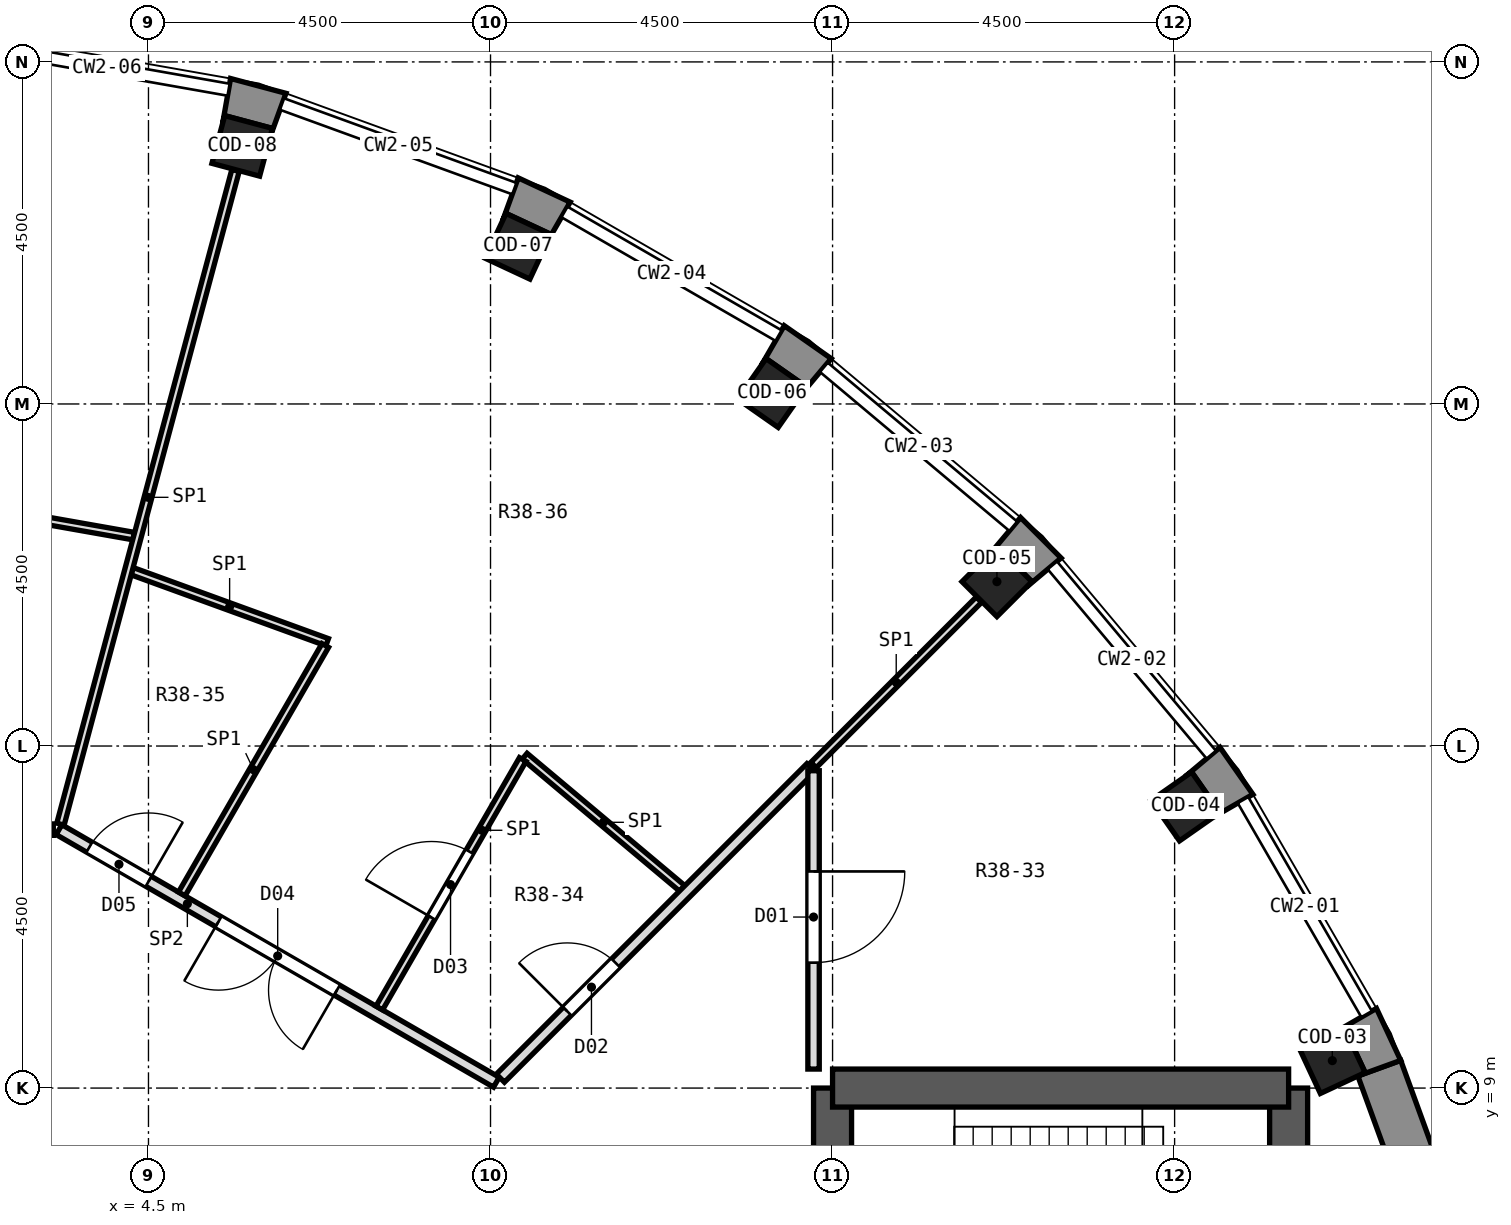
"""IFC4 building model, lengths in metres.
Left out: names, types, materials, properties, quantities, classifications, styles, units other than length and angle.
Written with IfcOpenShell. Run it as: python <this file> out.ifc"""

import sys

from ifc_helpers import new_model, si_unit, direction, frame, frame_2d, origin, origin_2d, place, context, subcontext, project, spatial, polyline, rectangle, outline, extrude, element, fill, save


model = new_model("IFC4")
c1 = context("Model", 3, precision=1e-05, world=origin(), true_north=direction((0.0, 1.0)))
c2 = subcontext(c1, "Body", "Model", "MODEL_VIEW")
j1 = project(units=[si_unit("LENGTHUNIT", "METRE"), si_unit("PLANEANGLEUNIT", "RADIAN")], contexts=[c1])
p1 = place(None, origin())
s1 = spatial("IfcSite", under=j1, at=p1, CompositionType="ELEMENT")
p2 = place(p1, origin())
s2 = spatial("IfcBuilding", under=s1, at=p2, CompositionType="ELEMENT")
p3 = place(p2, frame((0.0, 0.0, 279.2)))
s3 = spatial("IfcBuildingStorey", under=s2, at=p3, CompositionType="ELEMENT", Elevation=279.2)
for number, where, z_axis, x_axis in (
    (1, (20.075, 9.361, 0.0), (0.0, 0.0, 1.0), (0.906, 0.423, 0.0)),
    (2, (18.144, 12.705, 0.0), (0.0, 0.0, 1.0), (0.819, 0.574, 0.0)),
    (3, (15.662, 15.662, 0.0), (0.0, 0.0, 1.0), (0.707, 0.707, 0.0)),
    (4, (12.705, 18.144, 0.0), (0.0, 0.0, 1.0), (0.574, 0.819, 0.0)),
    (5, (9.361, 20.075, 0.0), (0.0, 0.0, 1.0), (0.423, 0.906, 0.0)),
    (6, (5.733, 21.395, 0.0), (0.0, 0.0, 1.0), (0.259, 0.966, 0.0)),
):
    element("IfcColumn", number, at=place(p3, frame(where, z_axis=z_axis, x_axis=x_axis)), inside=s3, PredefinedType="COLUMN", context=c2, shape_type="SweptSolid", body=[
        extrude(rectangle(XDim=0.65, YDim=0.65, at=origin_2d()), origin(), (0.0, 0.0, 1.0), 5.0),
    ])
p4 = place(p3, frame((13.5, -9.0, 0.0), z_axis=(0.0, 0.0, 1.0), x_axis=(0.0, 1.0, 0.0)))
e7 = element("IfcWall", 7, at=p4, inside=s3, PredefinedType="SHEAR", context=c2, shape_type="SweptSolid", body=[
    extrude(rectangle(XDim=18.0, YDim=0.5, at=frame_2d((9.0, 0.0))), origin(), (0.0, 0.0, 1.0), 5.0),
])
p5 = place(p4, frame((15.4, 0.0, 0.0)))
e8 = element("IfcOpeningElement", 8, at=p5, cuts=e7, PredefinedType="OPENING", context=c2, shape_type="SweptSolid", body=[
    extrude(rectangle(XDim=1.2, YDim=2.1, at=frame_2d((0.6, 1.05))), frame((0.0, 0.262, 0.0), z_axis=(0.0, -1.0, 0.0), x_axis=(1.0, 0.0, 0.0)), (0.0, 0.0, 1.0), 0.524),
])
p6 = place(p4, frame((1.4, 0.0, 0.0)))
e9 = element("IfcOpeningElement", 9, at=p6, cuts=e7, PredefinedType="OPENING", context=c2, shape_type="SweptSolid", body=[
    extrude(rectangle(XDim=1.2, YDim=2.1, at=frame_2d((0.6, 1.05))), frame((0.0, 0.262, 0.0), z_axis=(0.0, -1.0, 0.0), x_axis=(1.0, 0.0, 0.0)), (0.0, 0.0, 1.0), 0.524),
])
p7 = place(p4, frame((7.5, 0.0, 0.0)))
e10 = element("IfcOpeningElement", 10, at=p7, cuts=e7, PredefinedType="OPENING", context=c2, shape_type="SweptSolid", body=[
    extrude(rectangle(XDim=3.0, YDim=2.4, at=frame_2d((1.5, 1.2))), frame((0.0, 0.262, 0.0), z_axis=(0.0, -1.0, 0.0), x_axis=(1.0, 0.0, 0.0)), (0.0, 0.0, 1.0), 0.524),
])
p8 = place(p3, frame((19.5, -9.0, 0.0), z_axis=(0.0, 0.0, 1.0), x_axis=(0.0, 1.0, 0.0)))
e11 = element("IfcWall", 11, at=p8, inside=s3, PredefinedType="SHEAR", context=c2, shape_type="SweptSolid", body=[
    extrude(rectangle(XDim=18.0, YDim=0.5, at=frame_2d((9.0, 0.0))), origin(), (0.0, 0.0, 1.0), 5.0),
])
p9 = place(p8, frame((9.45, 0.0, 0.0)))
e12 = element("IfcOpeningElement", 12, at=p9, cuts=e11, PredefinedType="OPENING", context=c2, shape_type="SweptSolid", body=[
    extrude(rectangle(XDim=0.9, YDim=2.1, at=frame_2d((0.45, 1.05))), frame((0.0, 0.262, 0.0), z_axis=(0.0, -1.0, 0.0), x_axis=(1.0, 0.0, 0.0)), (0.0, 0.0, 1.0), 0.524),
])
p10 = place(p8, frame((7.65, 0.0, 0.0)))
e13 = element("IfcOpeningElement", 13, at=p10, cuts=e11, PredefinedType="OPENING", context=c2, shape_type="SweptSolid", body=[
    extrude(rectangle(XDim=0.9, YDim=2.1, at=frame_2d((0.45, 1.05))), frame((0.0, 0.262, 0.0), z_axis=(0.0, -1.0, 0.0), x_axis=(1.0, 0.0, 0.0)), (0.0, 0.0, 1.0), 0.524),
])
p11 = place(p3, frame((13.5, 9.0, 0.0), z_axis=(0.0, 0.0, 1.0), x_axis=(1.0, 0.0, 0.0)))
e14 = element("IfcWall", 14, at=p11, inside=s3, PredefinedType="SHEAR", context=c2, shape_type="SweptSolid", body=[
    extrude(rectangle(XDim=6.0, YDim=0.5, at=frame_2d((3.0, 0.0))), origin(), (0.0, 0.0, 1.0), 5.0),
])
p12 = place(p3, frame((21.805, 6.206, 0.0), z_axis=(0.0, 0.0, 1.0), x_axis=(-0.342056509473, 0.939679383794, 0.0)))
e15 = element("IfcWall", 15, at=p12, inside=s3, PredefinedType="SOLIDWALL", context=c2, shape_type="SweptSolid", body=[
    extrude(rectangle(XDim=3.252, YDim=0.6, at=frame_2d((1.626, 0.0))), origin(), (0.0, 0.0, 1.0), 4.45),
])
p13 = place(p3, origin())
e16 = element("IfcWall", 16, at=p13, inside=s3, PredefinedType="SOLIDWALL", context=c2, shape_type="SweptSolid", body=[
    extrude(outline(polyline([(20.975, 9.364), (20.656, 10.048), (20.136, 9.748), (20.232, 9.793), (20.507, 9.204), (20.411, 9.159), (20.975, 9.364)])), origin(), (0.0, 0.0, 1.0), 4.45),
])
p14 = place(p3, origin())
e17 = element("IfcWall", 17, at=p14, inside=s3, PredefinedType="SOLIDWALL", context=c2, shape_type="SweptSolid", body=[
    extrude(outline(polyline([(19.03, 12.864), (18.597, 13.482), (18.137, 13.097), (18.224, 13.157), (18.597, 12.625), (18.51, 12.564), (19.03, 12.864)])), origin(), (0.0, 0.0, 1.0), 4.45),
])
p15 = place(p3, origin())
e18 = element("IfcWall", 18, at=p15, inside=s3, PredefinedType="SOLIDWALL", context=c2, shape_type="SweptSolid", body=[
    extrude(outline(polyline([(15.973, 16.507), (15.588, 16.047), (15.662, 16.122), (16.122, 15.662), (16.047, 15.588), (16.507, 15.973), (15.973, 16.507)])), origin(), (0.0, 0.0, 1.0), 4.45),
])
p16 = place(p3, origin())
e19 = element("IfcWall", 19, at=p16, inside=s3, PredefinedType="SOLIDWALL", context=c2, shape_type="SweptSolid", body=[
    extrude(outline(polyline([(12.864, 19.03), (12.564, 18.51), (12.625, 18.597), (13.157, 18.224), (13.097, 18.137), (13.482, 18.597), (12.864, 19.03)])), origin(), (0.0, 0.0, 1.0), 4.45),
])
p17 = place(p3, origin())
e20 = element("IfcWall", 20, at=p17, inside=s3, PredefinedType="SOLIDWALL", context=c2, shape_type="SweptSolid", body=[
    extrude(outline(polyline([(10.048, 20.656), (9.364, 20.975), (9.159, 20.411), (9.204, 20.507), (9.793, 20.232), (9.748, 20.136), (10.048, 20.656)])), origin(), (0.0, 0.0, 1.0), 4.45),
])
p18 = place(p3, origin())
e21 = element("IfcWall", 21, at=p18, inside=s3, PredefinedType="SOLIDWALL", context=c2, shape_type="SweptSolid", body=[
    extrude(outline(polyline([(5.58, 22.282), (5.476, 21.691), (5.503, 21.793), (6.131, 21.625), (6.104, 21.523), (6.309, 22.087), (5.58, 22.282)])), origin(), (0.0, 0.0, 1.0), 4.45),
])
p19 = place(p3, frame((9.449, 13.366, 0.0), z_axis=(0.0, 0.0, 1.0), x_axis=(0.766094066965, -0.642728465653, 0.0)))
e22 = element("IfcWall", 22, at=p19, inside=s3, PredefinedType="PARTITIONING", context=c2, shape_type="SweptSolid", body=[
    extrude(rectangle(XDim=2.705, YDim=0.1, at=frame_2d((1.353, 0.0))), origin(), (0.0, 0.0, 1.0), 4.45),
])
p20 = place(p3, frame((3.323, 12.4, 0.0), z_axis=(0.0, 0.0, 1.0), x_axis=(0.865961614908, -0.500110469302, 0.0)))
e23 = element("IfcWall", 23, at=p20, inside=s3, PredefinedType="PARTITIONING", context=c2, shape_type="SweptSolid", body=[
    extrude(rectangle(XDim=6.645, YDim=0.15, at=frame_2d((3.322, 0.0))), origin(), (0.0, 0.0, 1.0), 4.45),
])
p21 = place(p20, frame((2.422, 0.0, 0.0)))
e24 = element("IfcOpeningElement", 24, at=p21, cuts=e23, PredefinedType="OPENING", context=c2, shape_type="SweptSolid", body=[
    extrude(rectangle(XDim=1.8, YDim=2.1, at=frame_2d((0.9, 1.05))), frame((0.0, 0.087, 0.0), z_axis=(0.0, -1.0, 0.0), x_axis=(1.0, 0.0, 0.0)), (0.0, 0.0, 1.0), 0.174),
])
p22 = place(p20, frame((0.461, 0.0, 0.0)))
e25 = element("IfcOpeningElement", 25, at=p22, cuts=e23, PredefinedType="OPENING", context=c2, shape_type="SweptSolid", body=[
    extrude(rectangle(XDim=0.9, YDim=2.1, at=frame_2d((0.45, 1.05))), frame((0.0, 0.087, 0.0), z_axis=(0.0, -1.0, 0.0), x_axis=(1.0, 0.0, 0.0)), (0.0, 0.0, 1.0), 0.174),
])
p23 = place(p3, frame((4.285, 15.8, 0.0), z_axis=(0.0, 0.0, 1.0), x_axis=(0.939712477851, -0.34196558156, 0.0)))
e26 = element("IfcWall", 26, at=p23, inside=s3, PredefinedType="PARTITIONING", context=c2, shape_type="SweptSolid", body=[
    extrude(rectangle(XDim=2.731, YDim=0.1, at=frame_2d((1.365, 0.0))), origin(), (0.0, 0.0, 1.0), 4.45),
])
p24 = place(p3, frame((1.5, 16.757, 0.0), z_axis=(0.0, 0.0, 1.0), x_axis=(0.984768889955, -0.173868436975, 0.0)))
e27 = element("IfcWall", 27, at=p24, inside=s3, PredefinedType="PARTITIONING", context=c2, shape_type="SweptSolid", body=[
    extrude(rectangle(XDim=2.849, YDim=0.1, at=frame_2d((1.425, 0.0))), origin(), (0.0, 0.0, 1.0), 4.45),
])
p25 = place(p3, frame((-3.273, 12.4, 0.0), z_axis=(0.0, 0.0, 1.0), x_axis=(1.0, 0.0, 0.0)))
e28 = element("IfcWall", 28, at=p25, inside=s3, PredefinedType="PARTITIONING", context=c2, shape_type="SweptSolid", body=[
    extrude(rectangle(XDim=6.521, YDim=0.15, at=frame_2d((3.26, 0.0))), origin(), (0.0, 0.0, 1.0), 4.45),
])
p26 = place(p25, frame((5.235, 0.0, 0.0)))
e29 = element("IfcOpeningElement", 29, at=p26, cuts=e28, PredefinedType="OPENING", context=c2, shape_type="SweptSolid", body=[
    extrude(rectangle(XDim=0.9, YDim=2.1, at=frame_2d((0.45, 1.05))), frame((0.0, 0.087, 0.0), z_axis=(0.0, -1.0, 0.0), x_axis=(1.0, 0.0, 0.0)), (0.0, 0.0, 1.0), 0.174),
])
p27 = place(p25, frame((2.373, 0.0, 0.0)))
e30 = element("IfcOpeningElement", 30, at=p27, cuts=e28, PredefinedType="OPENING", context=c2, shape_type="SweptSolid", body=[
    extrude(rectangle(XDim=1.8, YDim=2.1, at=frame_2d((0.9, 1.05))), frame((0.0, 0.087, 0.0), z_axis=(0.0, -1.0, 0.0), x_axis=(1.0, 0.0, 0.0)), (0.0, 0.0, 1.0), 0.174),
])
p28 = place(p25, frame((0.412, 0.0, 0.0)))
e31 = element("IfcOpeningElement", 31, at=p28, cuts=e28, PredefinedType="OPENING", context=c2, shape_type="SweptSolid", body=[
    extrude(rectangle(XDim=0.9, YDim=2.1, at=frame_2d((0.45, 1.05))), frame((0.0, 0.087, 0.0), z_axis=(0.0, -1.0, 0.0), x_axis=(1.0, 0.0, 0.0)), (0.0, 0.0, 1.0), 0.174),
])
p29 = place(p3, frame((13.25, 13.25, 0.0), z_axis=(0.0, 0.0, 1.0), x_axis=(0.707106781187, 0.707106781187, 0.0)))
e32 = element("IfcWall", 32, at=p29, inside=s3, PredefinedType="PARTITIONING", context=c2, shape_type="SweptSolid", body=[
    extrude(rectangle(XDim=3.077, YDim=0.1, at=frame_2d((1.538, 0.0))), origin(), (0.0, 0.0, 1.0), 4.45),
])
p30 = place(p3, frame((9.13, 9.13, 0.0), z_axis=(0.0, 0.0, 1.0), x_axis=(0.707106781187, 0.707106781187, 0.0)))
e33 = element("IfcWall", 33, at=p30, inside=s3, PredefinedType="PARTITIONING", context=c2, shape_type="SweptSolid", body=[
    extrude(rectangle(XDim=5.777, YDim=0.15, at=frame_2d((2.888, 0.0))), origin(), (0.0, 0.0, 1.0), 4.45),
])
p31 = place(p30, frame((1.244, 0.0, 0.0)))
e34 = element("IfcOpeningElement", 34, at=p31, cuts=e33, PredefinedType="OPENING", context=c2, shape_type="SweptSolid", body=[
    extrude(rectangle(XDim=0.9, YDim=2.1, at=frame_2d((0.45, 1.05))), frame((0.0, 0.087, 0.0), z_axis=(0.0, -1.0, 0.0), x_axis=(1.0, 0.0, 0.0)), (0.0, 0.0, 1.0), 0.174),
])
p32 = place(p3, frame((7.537, 10.053, 0.0), z_axis=(0.0, 0.0, 1.0), x_axis=(0.499957569697, 0.866049899545, 0.0)))
e35 = element("IfcWall", 35, at=p32, inside=s3, PredefinedType="PARTITIONING", context=c2, shape_type="SweptSolid", body=[
    extrude(rectangle(XDim=3.775, YDim=0.1, at=frame_2d((1.888, 0.0))), origin(), (0.0, 0.0, 1.0), 4.45),
])
p33 = place(p32, frame((1.375, 0.0, 0.0)))
e36 = element("IfcOpeningElement", 36, at=p33, cuts=e35, PredefinedType="OPENING", context=c2, shape_type="SweptSolid", body=[
    extrude(rectangle(XDim=1.0, YDim=2.1, at=frame_2d((0.5, 1.05))), frame((0.0, 0.062, 0.0), z_axis=(0.0, -1.0, 0.0), x_axis=(1.0, 0.0, 0.0)), (0.0, 0.0, 1.0), 0.124),
])
p34 = place(p3, frame((4.938, 11.554, 0.0), z_axis=(0.0, 0.0, 1.0), x_axis=(0.50004158446, 0.866001393654, 0.0)))
e37 = element("IfcWall", 37, at=p34, inside=s3, PredefinedType="PARTITIONING", context=c2, shape_type="SweptSolid", body=[
    extrude(rectangle(XDim=3.775, YDim=0.1, at=frame_2d((1.887, 0.0))), origin(), (0.0, 0.0, 1.0), 4.45),
])
p35 = place(p3, frame((3.342, 12.472, 0.0), z_axis=(0.0, 0.0, 1.0), x_axis=(0.258684909749, 0.965961757767, 0.0)))
e38 = element("IfcWall", 38, at=p35, inside=s3, PredefinedType="PARTITIONING", context=c2, shape_type="SweptSolid", body=[
    extrude(rectangle(XDim=8.903, YDim=0.1, at=frame_2d((4.451, 0.0))), origin(), (0.0, 0.0, 1.0), 4.45),
])
p36 = place(p3, frame((13.25, 9.25, 0.0), z_axis=(0.0, 0.0, 1.0), x_axis=(0.0, 1.0, 0.0)))
e39 = element("IfcWall", 39, at=p36, inside=s3, PredefinedType="PARTITIONING", context=c2, shape_type="SweptSolid", body=[
    extrude(rectangle(XDim=3.925, YDim=0.15, at=frame_2d((1.962, 0.0))), origin(), (0.0, 0.0, 1.0), 4.45),
])
p37 = place(p36, frame((1.4, 0.0, 0.0)))
e40 = element("IfcOpeningElement", 40, at=p37, cuts=e39, PredefinedType="OPENING", context=c2, shape_type="SweptSolid", body=[
    extrude(rectangle(XDim=1.2, YDim=2.1, at=frame_2d((0.6, 1.05))), frame((0.0, 0.087, 0.0), z_axis=(0.0, -1.0, 0.0), x_axis=(1.0, 0.0, 0.0)), (0.0, 0.0, 1.0), 0.174),
])
p38 = place(p37, frame((1.2, 0.0, 0.0), z_axis=(0.0, 0.0, 1.0), x_axis=(-1.0, 0.0, 0.0)))
e41 = element("IfcDoor", 41, at=p38, inside=s3, OperationType="SINGLE_SWING_LEFT", PredefinedType="DOOR", context=c2, shape_type="SweptSolid", body=[
    extrude(rectangle(XDim=1.2, YDim=2.1, at=frame_2d((0.6, 1.05))), frame((0.0, 0.025, 0.0), z_axis=(0.0, -1.0, 0.0), x_axis=(1.0, 0.0, 0.0)), (0.0, 0.0, 1.0), 0.05),
])
fill(e40, e41)
p39 = place(p31, origin())
e42 = element("IfcDoor", 42, at=p39, inside=s3, OperationType="SINGLE_SWING_LEFT", PredefinedType="DOOR", context=c2, shape_type="SweptSolid", body=[
    extrude(rectangle(XDim=0.9, YDim=2.1, at=frame_2d((0.45, 1.05))), frame((0.0, 0.025, 0.0), z_axis=(0.0, -1.0, 0.0), x_axis=(1.0, 0.0, 0.0)), (0.0, 0.0, 1.0), 0.05),
])
fill(e34, e42)
p40 = place(p33, origin())
e43 = element("IfcDoor", 43, at=p40, inside=s3, OperationType="SINGLE_SWING_LEFT", PredefinedType="DOOR", context=c2, shape_type="SweptSolid", body=[
    extrude(rectangle(XDim=1.0, YDim=2.1, at=frame_2d((0.5, 1.05))), frame((0.0, 0.025, 0.0), z_axis=(0.0, -1.0, 0.0), x_axis=(1.0, 0.0, 0.0)), (0.0, 0.0, 1.0), 0.05),
])
fill(e36, e43)
p41 = place(p21, frame((1.8, 0.0, 0.0), z_axis=(0.0, 0.0, 1.0), x_axis=(-1.0, 0.0, 0.0)))
e44 = element("IfcDoor", 44, at=p41, inside=s3, OperationType="DOUBLE_DOOR_SINGLE_SWING", PredefinedType="DOOR", context=c2, shape_type="SweptSolid", body=[
    extrude(rectangle(XDim=1.8, YDim=2.1, at=frame_2d((0.9, 1.05))), frame((0.0, 0.025, 0.0), z_axis=(0.0, -1.0, 0.0), x_axis=(1.0, 0.0, 0.0)), (0.0, 0.0, 1.0), 0.05),
])
fill(e24, e44)
p42 = place(p22, origin())
e45 = element("IfcDoor", 45, at=p42, inside=s3, OperationType="SINGLE_SWING_RIGHT", PredefinedType="DOOR", context=c2, shape_type="SweptSolid", body=[
    extrude(rectangle(XDim=0.9, YDim=2.1, at=frame_2d((0.45, 1.05))), frame((0.0, 0.025, 0.0), z_axis=(0.0, -1.0, 0.0), x_axis=(1.0, 0.0, 0.0)), (0.0, 0.0, 1.0), 0.05),
])
fill(e25, e45)
save(model, sys.argv[1])
